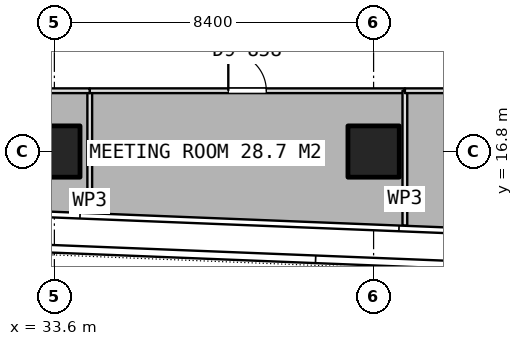
"""IFC4 building model, lengths in metres.
Left out: names, types, materials, properties, quantities, classifications, styles, units other than length and angle.
Written with IfcOpenShell. Run it as: python <this file> out.ifc"""

import sys

from ifc_helpers import new_model, si_unit, direction, frame, frame_2d, origin, origin_2d, place, context, subcontext, project, spatial, rectangle, extrude, element, fill, save


model = new_model("IFC4")
c1 = context("Model", 3, precision=1e-05, world=origin(), true_north=direction((0.0, 1.0)))
c2 = subcontext(c1, "Body", "Model", "MODEL_VIEW")
j1 = project(units=[si_unit("LENGTHUNIT", "METRE"), si_unit("PLANEANGLEUNIT", "RADIAN")], contexts=[c1])
p1 = place(None, origin())
s1 = spatial("IfcSite", under=j1, at=p1, CompositionType="ELEMENT")
p2 = place(p1, origin())
s2 = spatial("IfcBuilding", under=s1, at=p2, CompositionType="ELEMENT")
p3 = place(p2, frame((0.0, 0.0, 213.95)))
s3 = spatial("IfcBuildingStorey", under=s2, at=p3, CompositionType="ELEMENT", Elevation=213.95)
for number, where, z_axis, x_axis in (
    (1, (33.6, 16.8, 0.0), (0.0, 0.0, 1.0), (1.0, 0.0, 0.0)),
    (2, (42.0, 16.8, 0.0), (0.0, 0.0, 1.0), (1.0, 0.0, 0.0)),
):
    element("IfcColumn", number, at=place(p3, frame(where, z_axis=z_axis, x_axis=x_axis)), inside=s3, PredefinedType="COLUMN", context=c2, shape_type="SweptSolid", body=[
        extrude(rectangle(XDim=1.35, YDim=1.35, at=origin_2d()), origin(), (0.0, 0.0, 1.0), 3.75),
    ])
p4 = place(p3, frame((34.531, 15.182, 0.0), z_axis=(0.0, 0.0, 1.0), x_axis=(0.0, 1.0, 0.0)))
e3 = element("IfcWall", 3, at=p4, inside=s3, PredefinedType="PARTITIONING", context=c2, shape_type="SweptSolid", body=[
    extrude(rectangle(XDim=3.218, YDim=0.125, at=frame_2d((1.609, 0.0))), origin(), (0.0, 0.0, 1.0), 3.5),
])
p5 = place(p3, frame((34.531, 18.4, 0.0), z_axis=(0.0, 0.0, 1.0), x_axis=(1.0, 0.0, 0.0)))
e4 = element("IfcWall", 4, at=p5, inside=s3, PredefinedType="PARTITIONING", context=c2, shape_type="SweptSolid", body=[
    extrude(rectangle(XDim=8.292, YDim=0.125, at=frame_2d((4.146, 0.0))), origin(), (0.0, 0.0, 1.0), 3.5),
])
p6 = place(p5, frame((3.646, 0.0, 0.0)))
e5 = element("IfcOpeningElement", 5, at=p6, cuts=e4, PredefinedType="OPENING", context=c2, shape_type="SweptSolid", body=[
    extrude(rectangle(XDim=1.0, YDim=2.1, at=frame_2d((0.5, 1.05))), frame((0.0, 0.073, 0.0), z_axis=(0.0, -1.0, 0.0), x_axis=(1.0, 0.0, 0.0)), (0.0, 0.0, 1.0), 0.145),
])
p7 = place(p3, frame((42.823, 18.4, 0.0), z_axis=(0.0, 0.0, 1.0), x_axis=(0.0, -1.0, 0.0)))
e6 = element("IfcWall", 6, at=p7, inside=s3, PredefinedType="PARTITIONING", context=c2, shape_type="SweptSolid", body=[
    extrude(rectangle(XDim=3.549, YDim=0.125, at=frame_2d((1.774, 0.0))), origin(), (0.0, 0.0, 1.0), 3.5),
])
p8 = place(p3, frame((42.824, 18.4, 0.0), z_axis=(0.0, 0.0, 1.0), x_axis=(1.0, 0.0, 0.0)))
e7 = element("IfcWall", 7, at=p8, inside=s3, PredefinedType="PARTITIONING", context=c2, shape_type="SweptSolid", body=[
    extrude(rectangle(XDim=8.466, YDim=0.125, at=frame_2d((4.233, 0.0))), origin(), (0.0, 0.0, 1.0), 3.5),
])
p9 = place(p8, frame((3.733, 0.0, 0.0)))
e8 = element("IfcOpeningElement", 8, at=p9, cuts=e7, PredefinedType="OPENING", context=c2, shape_type="SweptSolid", body=[
    extrude(rectangle(XDim=1.0, YDim=2.1, at=frame_2d((0.5, 1.05))), frame((0.0, 0.073, 0.0), z_axis=(0.0, -1.0, 0.0), x_axis=(1.0, 0.0, 0.0)), (0.0, 0.0, 1.0), 0.145),
])
p10 = place(p3, frame((26.058, 18.4, 0.0), z_axis=(0.0, 0.0, 1.0), x_axis=(1.0, 0.0, 0.0)))
e9 = element("IfcWall", 9, at=p10, inside=s3, PredefinedType="PARTITIONING", context=c2, shape_type="SweptSolid", body=[
    extrude(rectangle(XDim=8.472, YDim=0.125, at=frame_2d((4.236, 0.0))), origin(), (0.0, 0.0, 1.0), 3.5),
])
p11 = place(p10, frame((3.736, 0.0, 0.0)))
e10 = element("IfcOpeningElement", 10, at=p11, cuts=e9, PredefinedType="OPENING", context=c2, shape_type="SweptSolid", body=[
    extrude(rectangle(XDim=1.0, YDim=2.1, at=frame_2d((0.5, 1.05))), frame((0.0, 0.073, 0.0), z_axis=(0.0, -1.0, 0.0), x_axis=(1.0, 0.0, 0.0)), (0.0, 0.0, 1.0), 0.145),
])
p12 = place(p6, origin())
e11 = element("IfcDoor", 11, at=p12, inside=s3, OperationType="SINGLE_SWING_LEFT", PredefinedType="DOOR", context=c2, shape_type="SweptSolid", body=[
    extrude(rectangle(XDim=1.0, YDim=2.1, at=frame_2d((0.5, 1.05))), frame((0.0, 0.025, 0.0), z_axis=(0.0, -1.0, 0.0), x_axis=(1.0, 0.0, 0.0)), (0.0, 0.0, 1.0), 0.05),
])
fill(e5, e11)
save(model, sys.argv[1])
